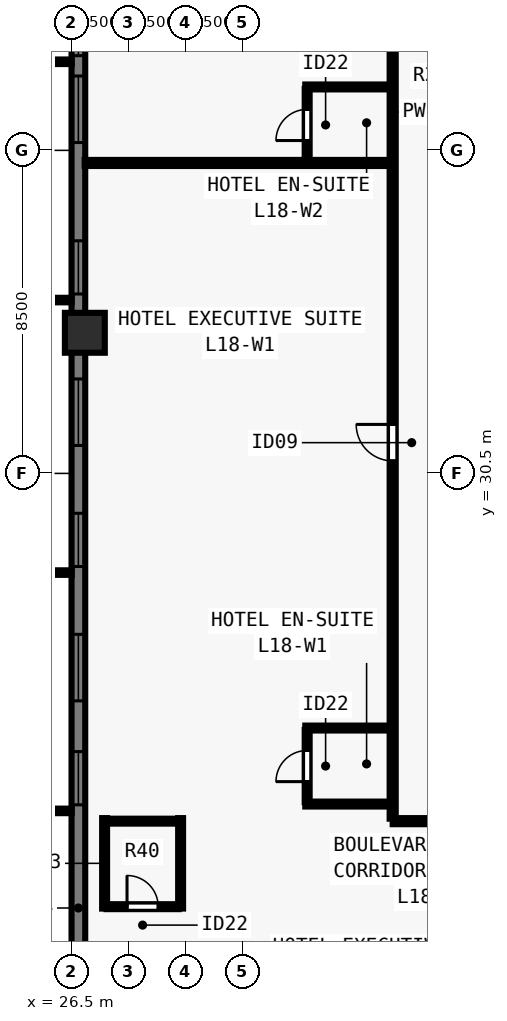
"""IFC4 building model, lengths in metres.
Left out: names, types, materials, properties, quantities, classifications, styles, units other than length and angle.
Written with IfcOpenShell. Run it as: python <this file> out.ifc"""

import sys

from ifc_helpers import new_model, si_unit, direction, frame, frame_2d, origin, origin_2d, place, context, subcontext, project, spatial, rectangle, extrude, element, fill, save


model = new_model("IFC4")
c1 = context("Model", 3, precision=1e-05, world=origin(), true_north=direction((0.0, 1.0)))
c2 = subcontext(c1, "Body", "Model", "MODEL_VIEW")
j1 = project(units=[si_unit("LENGTHUNIT", "METRE"), si_unit("PLANEANGLEUNIT", "RADIAN")], contexts=[c1])
p1 = place(None, origin())
s1 = spatial("IfcSite", under=j1, at=p1, CompositionType="ELEMENT")
p2 = place(p1, origin())
s2 = spatial("IfcBuilding", under=s1, at=p2, CompositionType="ELEMENT")
p3 = place(p2, frame((0.0, 0.0, 69.0)))
s3 = spatial("IfcBuildingStorey", under=s2, at=p3, CompositionType="ELEMENT", Elevation=69.0)
p4 = place(p3, frame((26.85, 34.2, 0.0), z_axis=(0.0, 0.0, 1.0), x_axis=(0.0, 1.0, 0.0)))
e1 = element("IfcColumn", 1, at=p4, inside=s3, PredefinedType="COLUMN", context=c2, shape_type="SweptSolid", body=[
    extrude(rectangle(XDim=1.05, YDim=1.05, at=origin_2d()), origin(), (0.0, 0.0, 1.0), 3.5),
])
p5 = place(p3, frame((26.68, 16.5, 0.0), z_axis=(0.0, 0.0, 1.0), x_axis=(0.0, 1.0, 0.0)))
e2 = element("IfcWall", 2, at=p5, inside=s3, PredefinedType="SOLIDWALL", context=c2, shape_type="SweptSolid", body=[
    extrude(rectangle(XDim=44.662, YDim=0.36, at=frame_2d((22.331, 0.0))), origin(), (0.0, 0.0, 1.0), 3.28),
])
p6 = place(p5, frame((5.28, 0.0, 0.8)))
e3 = element("IfcOpeningElement", 3, at=p6, cuts=e2, PredefinedType="OPENING", context=c2, shape_type="SweptSolid", body=[
    extrude(rectangle(XDim=1.4, YDim=1.544, at=frame_2d((0.7, 0.772))), frame((0.0, 0.19, 0.0), z_axis=(0.0, -1.0, 0.0), x_axis=(1.0, 0.0, 0.0)), (0.0, 0.0, 1.0), 0.38),
])
p7 = place(p5, frame((8.015, 0.0, 0.8)))
e4 = element("IfcOpeningElement", 4, at=p7, cuts=e2, PredefinedType="OPENING", context=c2, shape_type="SweptSolid", body=[
    extrude(rectangle(XDim=1.75, YDim=1.544, at=frame_2d((0.875, 0.772))), frame((0.0, 0.19, 0.0), z_axis=(0.0, -1.0, 0.0), x_axis=(1.0, 0.0, 0.0)), (0.0, 0.0, 1.0), 0.38),
])
p8 = place(p5, frame((11.551, 0.0, 0.8)))
e5 = element("IfcOpeningElement", 5, at=p8, cuts=e2, PredefinedType="OPENING", context=c2, shape_type="SweptSolid", body=[
    extrude(rectangle(XDim=1.4, YDim=1.544, at=frame_2d((0.7, 0.772))), frame((0.0, 0.19, 0.0), z_axis=(0.0, -1.0, 0.0), x_axis=(1.0, 0.0, 0.0)), (0.0, 0.0, 1.0), 0.38),
])
p9 = place(p5, frame((14.736, 0.0, 0.8)))
e6 = element("IfcOpeningElement", 6, at=p9, cuts=e2, PredefinedType="OPENING", context=c2, shape_type="SweptSolid", body=[
    extrude(rectangle(XDim=1.75, YDim=1.544, at=frame_2d((0.875, 0.772))), frame((0.0, 0.19, 0.0), z_axis=(0.0, -1.0, 0.0), x_axis=(1.0, 0.0, 0.0)), (0.0, 0.0, 1.0), 0.38),
])
p10 = place(p5, frame((18.721, 0.0, 0.8)))
e7 = element("IfcOpeningElement", 7, at=p10, cuts=e2, PredefinedType="OPENING", context=c2, shape_type="SweptSolid", body=[
    extrude(rectangle(XDim=1.4, YDim=1.544, at=frame_2d((0.7, 0.772))), frame((0.0, 0.19, 0.0), z_axis=(0.0, -1.0, 0.0), x_axis=(1.0, 0.0, 0.0)), (0.0, 0.0, 1.0), 0.38),
])
p11 = place(p5, frame((22.706, 0.0, 0.8)))
e8 = element("IfcOpeningElement", 8, at=p11, cuts=e2, PredefinedType="OPENING", context=c2, shape_type="SweptSolid", body=[
    extrude(rectangle(XDim=1.75, YDim=1.544, at=frame_2d((0.875, 0.772))), frame((0.0, 0.19, 0.0), z_axis=(0.0, -1.0, 0.0), x_axis=(1.0, 0.0, 0.0)), (0.0, 0.0, 1.0), 0.38),
])
p12 = place(p5, frame((24.991, 0.0, 0.8)))
e9 = element("IfcOpeningElement", 9, at=p12, cuts=e2, PredefinedType="OPENING", context=c2, shape_type="SweptSolid", body=[
    extrude(rectangle(XDim=1.4, YDim=1.544, at=frame_2d((0.7, 0.772))), frame((0.0, 0.19, 0.0), z_axis=(0.0, -1.0, 0.0), x_axis=(1.0, 0.0, 0.0)), (0.0, 0.0, 1.0), 0.38),
])
p13 = place(p5, frame((28.177, 0.0, 0.8)))
e10 = element("IfcOpeningElement", 10, at=p13, cuts=e2, PredefinedType="OPENING", context=c2, shape_type="SweptSolid", body=[
    extrude(rectangle(XDim=1.75, YDim=1.544, at=frame_2d((0.875, 0.772))), frame((0.0, 0.19, 0.0), z_axis=(0.0, -1.0, 0.0), x_axis=(1.0, 0.0, 0.0)), (0.0, 0.0, 1.0), 0.38),
])
p14 = place(p5, frame((31.711, 0.0, 0.8)))
e11 = element("IfcOpeningElement", 11, at=p14, cuts=e2, PredefinedType="OPENING", context=c2, shape_type="SweptSolid", body=[
    extrude(rectangle(XDim=1.4, YDim=1.544, at=frame_2d((0.7, 0.772))), frame((0.0, 0.19, 0.0), z_axis=(0.0, -1.0, 0.0), x_axis=(1.0, 0.0, 0.0)), (0.0, 0.0, 1.0), 0.38),
])
p15 = place(p5, frame((34.897, 0.0, 0.8)))
e12 = element("IfcOpeningElement", 12, at=p15, cuts=e2, PredefinedType="OPENING", context=c2, shape_type="SweptSolid", body=[
    extrude(rectangle(XDim=1.75, YDim=1.544, at=frame_2d((0.875, 0.772))), frame((0.0, 0.19, 0.0), z_axis=(0.0, -1.0, 0.0), x_axis=(1.0, 0.0, 0.0)), (0.0, 0.0, 1.0), 0.38),
])
p16 = place(p5, frame((37.982, 0.0, 0.8)))
e13 = element("IfcOpeningElement", 13, at=p16, cuts=e2, PredefinedType="OPENING", context=c2, shape_type="SweptSolid", body=[
    extrude(rectangle(XDim=1.4, YDim=1.544, at=frame_2d((0.7, 0.772))), frame((0.0, 0.19, 0.0), z_axis=(0.0, -1.0, 0.0), x_axis=(1.0, 0.0, 0.0)), (0.0, 0.0, 1.0), 0.38),
])
p17 = place(p3, frame((34.95, 21.35, 0.0), z_axis=(0.0, 0.0, 1.0), x_axis=(1.0, 0.0, 0.0)))
e14 = element("IfcWall", 14, at=p17, inside=s3, PredefinedType="PARTITIONING", context=c2, shape_type="SweptSolid", body=[
    extrude(rectangle(XDim=34.1, YDim=0.16, at=frame_2d((17.05, 0.0))), origin(), (0.0, 0.0, 1.0), 3.28),
])
p18 = place(p17, frame((3.614, 0.0, 0.0)))
e15 = element("IfcOpeningElement", 15, at=p18, cuts=e14, PredefinedType="OPENING", context=c2, shape_type="SweptSolid", body=[
    extrude(rectangle(XDim=0.96, YDim=2.15, at=frame_2d((0.48, 1.075))), frame((0.0, 0.09, 0.0), z_axis=(0.0, -1.0, 0.0), x_axis=(1.0, 0.0, 0.0)), (0.0, 0.0, 1.0), 0.18),
])
p19 = place(p17, frame((17.56, 0.0, 0.0)))
e16 = element("IfcOpeningElement", 16, at=p19, cuts=e14, PredefinedType="OPENING", context=c2, shape_type="SweptSolid", body=[
    extrude(rectangle(XDim=0.96, YDim=2.15, at=frame_2d((0.48, 1.075))), frame((0.0, 0.09, 0.0), z_axis=(0.0, -1.0, 0.0), x_axis=(1.0, 0.0, 0.0)), (0.0, 0.0, 1.0), 0.18),
])
p20 = place(p17, frame((30.516, 0.0, 0.0)))
e17 = element("IfcOpeningElement", 17, at=p20, cuts=e14, PredefinedType="OPENING", context=c2, shape_type="SweptSolid", body=[
    extrude(rectangle(XDim=0.96, YDim=2.15, at=frame_2d((0.48, 1.075))), frame((0.0, 0.09, 0.0), z_axis=(0.0, -1.0, 0.0), x_axis=(1.0, 0.0, 0.0)), (0.0, 0.0, 1.0), 0.18),
])
p21 = place(p3, frame((34.95, 21.415, 0.0), z_axis=(0.0, 0.0, 1.0), x_axis=(0.0, 1.0, 0.0)))
e18 = element("IfcWall", 18, at=p21, inside=s3, PredefinedType="PARTITIONING", context=c2, shape_type="SweptSolid", body=[
    extrude(rectangle(XDim=35.17, YDim=0.16, at=frame_2d((17.585, 0.0))), origin(), (0.0, 0.0, 1.0), 3.28),
])
p22 = place(p21, frame((9.414, 0.0, 0.0)))
e19 = element("IfcOpeningElement", 19, at=p22, cuts=e18, PredefinedType="OPENING", context=c2, shape_type="SweptSolid", body=[
    extrude(rectangle(XDim=0.96, YDim=2.15, at=frame_2d((0.48, 1.075))), frame((0.0, 0.09, 0.0), z_axis=(0.0, -1.0, 0.0), x_axis=(1.0, 0.0, 0.0)), (0.0, 0.0, 1.0), 0.18),
])
p23 = place(p21, frame((26.814, 0.0, 0.0)))
e20 = element("IfcOpeningElement", 20, at=p23, cuts=e18, PredefinedType="OPENING", context=c2, shape_type="SweptSolid", body=[
    extrude(rectangle(XDim=0.96, YDim=2.15, at=frame_2d((0.48, 1.075))), frame((0.0, 0.09, 0.0), z_axis=(0.0, -1.0, 0.0), x_axis=(1.0, 0.0, 0.0)), (0.0, 0.0, 1.0), 0.18),
])
for number, where, z_axis, x_axis in (
    (21, (27.37, 19.05, 0.0), (0.0, 0.0, 1.0), (0.0, 1.0, 0.0)),
    (22, (29.37, 19.05, 0.0), (0.0, 0.0, 1.0), (0.0, 1.0, 0.0)),
):
    element("IfcWall", number, at=place(p3, frame(where, z_axis=z_axis, x_axis=x_axis)), inside=s3, PredefinedType="PLUMBINGWALL", context=c2, shape_type="SweptSolid", body=[
        extrude(rectangle(XDim=2.38, YDim=0.13, at=frame_2d((1.19, 0.0))), origin(), (0.0, 0.0, 1.0), 3.28),
    ])
p24 = place(p3, frame((27.42, 19.1, 0.0), z_axis=(0.0, 0.0, 1.0), x_axis=(1.0, 0.0, 0.0)))
e23 = element("IfcWall", 23, at=p24, inside=s3, PredefinedType="PLUMBINGWALL", context=c2, shape_type="SweptSolid", body=[
    extrude(rectangle(XDim=1.9, YDim=0.13, at=frame_2d((0.95, 0.0))), origin(), (0.0, 0.0, 1.0), 3.28),
])
p25 = place(p24, frame((0.54, 0.0, 0.0)))
e24 = element("IfcOpeningElement", 24, at=p25, cuts=e23, PredefinedType="OPENING", context=c2, shape_type="SweptSolid", body=[
    extrude(rectangle(XDim=0.82, YDim=2.1, at=frame_2d((0.41, 1.05))), frame((0.0, 0.075, 0.0), z_axis=(0.0, -1.0, 0.0), x_axis=(1.0, 0.0, 0.0)), (0.0, 0.0, 1.0), 0.15),
])
p26 = place(p3, frame((27.42, 21.35, 0.0), z_axis=(0.0, 0.0, 1.0), x_axis=(1.0, 0.0, 0.0)))
e25 = element("IfcWall", 25, at=p26, inside=s3, PredefinedType="PLUMBINGWALL", context=c2, shape_type="SweptSolid", body=[
    extrude(rectangle(XDim=1.9, YDim=0.13, at=frame_2d((0.95, 0.0))), origin(), (0.0, 0.0, 1.0), 3.28),
])
p27 = place(p3, frame((32.65, 21.8, 0.0), z_axis=(0.0, 0.0, 1.0), x_axis=(1.0, 0.0, 0.0)))
e26 = element("IfcWall", 26, at=p27, inside=s3, PredefinedType="PLUMBINGWALL", context=c2, shape_type="SweptSolid", body=[
    extrude(rectangle(XDim=2.235, YDim=0.13, at=frame_2d((1.118, 0.0))), origin(), (0.0, 0.0, 1.0), 2.849),
])
p28 = place(p3, frame((32.65, 23.8, 0.0), z_axis=(0.0, 0.0, 1.0), x_axis=(1.0, 0.0, 0.0)))
e27 = element("IfcWall", 27, at=p28, inside=s3, PredefinedType="PLUMBINGWALL", context=c2, shape_type="SweptSolid", body=[
    extrude(rectangle(XDim=2.235, YDim=0.13, at=frame_2d((1.118, 0.0))), origin(), (0.0, 0.0, 1.0), 3.28),
])
p29 = place(p3, frame((32.7, 21.85, 0.0), z_axis=(0.0, 0.0, 1.0), x_axis=(0.0, 1.0, 0.0)))
e28 = element("IfcWall", 28, at=p29, inside=s3, PredefinedType="PLUMBINGWALL", context=c2, shape_type="SweptSolid", body=[
    extrude(rectangle(XDim=1.9, YDim=0.13, at=frame_2d((0.95, 0.0))), origin(), (0.0, 0.0, 1.0), 3.28),
])
p30 = place(p29, frame((0.54, 0.0, 0.0)))
e29 = element("IfcOpeningElement", 29, at=p30, cuts=e28, PredefinedType="OPENING", context=c2, shape_type="SweptSolid", body=[
    extrude(rectangle(XDim=0.82, YDim=2.1, at=frame_2d((0.41, 1.05))), frame((0.0, 0.075, 0.0), z_axis=(0.0, -1.0, 0.0), x_axis=(1.0, 0.0, 0.0)), (0.0, 0.0, 1.0), 0.15),
])
p31 = place(p3, frame((26.845, 38.668, 0.0), z_axis=(0.0, 0.0, 1.0), x_axis=(1.0, 0.0, 0.0)))
e30 = element("IfcWall", 30, at=p31, inside=s3, PredefinedType="PARTITIONING", context=c2, shape_type="SweptSolid", body=[
    extrude(rectangle(XDim=8.04, YDim=0.16, at=frame_2d((4.02, 0.0))), origin(), (0.0, 0.0, 1.0), 2.849),
])
p32 = place(p3, frame((32.65, 40.668, 0.0), z_axis=(0.0, 0.0, 1.0), x_axis=(1.0, 0.0, 0.0)))
e31 = element("IfcWall", 31, at=p32, inside=s3, PredefinedType="PLUMBINGWALL", context=c2, shape_type="SweptSolid", body=[
    extrude(rectangle(XDim=2.235, YDim=0.13, at=frame_2d((1.118, 0.0))), origin(), (0.0, 0.0, 1.0), 3.28),
])
p33 = place(p3, frame((32.7, 38.733, 0.0), z_axis=(0.0, 0.0, 1.0), x_axis=(0.0, 1.0, 0.0)))
e32 = element("IfcWall", 32, at=p33, inside=s3, PredefinedType="PLUMBINGWALL", context=c2, shape_type="SweptSolid", body=[
    extrude(rectangle(XDim=1.885, YDim=0.13, at=frame_2d((0.942, 0.0))), origin(), (0.0, 0.0, 1.0), 3.28),
])
p34 = place(p33, frame((0.525, 0.0, 0.0)))
e33 = element("IfcOpeningElement", 33, at=p34, cuts=e32, PredefinedType="OPENING", context=c2, shape_type="SweptSolid", body=[
    extrude(rectangle(XDim=0.82, YDim=2.1, at=frame_2d((0.41, 1.05))), frame((0.0, 0.075, 0.0), z_axis=(0.0, -1.0, 0.0), x_axis=(1.0, 0.0, 0.0)), (0.0, 0.0, 1.0), 0.15),
])
p35 = place(p6, origin())
e34 = element("IfcWindow", 34, at=p35, inside=s3, PartitioningType="SINGLE_PANEL", PredefinedType="WINDOW", context=c2, shape_type="SweptSolid", body=[
    extrude(rectangle(XDim=1.4, YDim=1.544, at=frame_2d((0.7, 0.772))), frame((0.0, -0.05, 0.0), z_axis=(0.0, -1.0, 0.0), x_axis=(1.0, 0.0, 0.0)), (0.0, 0.0, 1.0), 0.06),
])
fill(e3, e34)
p36 = place(p7, origin())
e35 = element("IfcWindow", 35, at=p36, inside=s3, PartitioningType="SINGLE_PANEL", PredefinedType="WINDOW", context=c2, shape_type="SweptSolid", body=[
    extrude(rectangle(XDim=1.75, YDim=1.544, at=frame_2d((0.875, 0.772))), frame((0.0, -0.05, 0.0), z_axis=(0.0, -1.0, 0.0), x_axis=(1.0, 0.0, 0.0)), (0.0, 0.0, 1.0), 0.06),
])
fill(e4, e35)
p37 = place(p8, origin())
e36 = element("IfcWindow", 36, at=p37, inside=s3, PartitioningType="SINGLE_PANEL", PredefinedType="WINDOW", context=c2, shape_type="SweptSolid", body=[
    extrude(rectangle(XDim=1.4, YDim=1.544, at=frame_2d((0.7, 0.772))), frame((0.0, -0.05, 0.0), z_axis=(0.0, -1.0, 0.0), x_axis=(1.0, 0.0, 0.0)), (0.0, 0.0, 1.0), 0.06),
])
fill(e5, e36)
p38 = place(p9, origin())
e37 = element("IfcWindow", 37, at=p38, inside=s3, PartitioningType="SINGLE_PANEL", PredefinedType="WINDOW", context=c2, shape_type="SweptSolid", body=[
    extrude(rectangle(XDim=1.75, YDim=1.544, at=frame_2d((0.875, 0.772))), frame((0.0, -0.05, 0.0), z_axis=(0.0, -1.0, 0.0), x_axis=(1.0, 0.0, 0.0)), (0.0, 0.0, 1.0), 0.06),
])
fill(e6, e37)
p39 = place(p10, origin())
e38 = element("IfcWindow", 38, at=p39, inside=s3, PartitioningType="SINGLE_PANEL", PredefinedType="WINDOW", context=c2, shape_type="SweptSolid", body=[
    extrude(rectangle(XDim=1.4, YDim=1.544, at=frame_2d((0.7, 0.772))), frame((0.0, -0.05, 0.0), z_axis=(0.0, -1.0, 0.0), x_axis=(1.0, 0.0, 0.0)), (0.0, 0.0, 1.0), 0.06),
])
fill(e7, e38)
p40 = place(p11, origin())
e39 = element("IfcWindow", 39, at=p40, inside=s3, PartitioningType="SINGLE_PANEL", PredefinedType="WINDOW", context=c2, shape_type="SweptSolid", body=[
    extrude(rectangle(XDim=1.75, YDim=1.544, at=frame_2d((0.875, 0.772))), frame((0.0, -0.05, 0.0), z_axis=(0.0, -1.0, 0.0), x_axis=(1.0, 0.0, 0.0)), (0.0, 0.0, 1.0), 0.06),
])
fill(e8, e39)
p41 = place(p12, origin())
e40 = element("IfcWindow", 40, at=p41, inside=s3, PartitioningType="SINGLE_PANEL", PredefinedType="WINDOW", context=c2, shape_type="SweptSolid", body=[
    extrude(rectangle(XDim=1.4, YDim=1.544, at=frame_2d((0.7, 0.772))), frame((0.0, -0.05, 0.0), z_axis=(0.0, -1.0, 0.0), x_axis=(1.0, 0.0, 0.0)), (0.0, 0.0, 1.0), 0.06),
])
fill(e9, e40)
p42 = place(p25, origin())
e41 = element("IfcDoor", 41, at=p42, inside=s3, OperationType="SINGLE_SWING_LEFT", PredefinedType="DOOR", context=c2, shape_type="SweptSolid", body=[
    extrude(rectangle(XDim=0.82, YDim=2.1, at=frame_2d((0.41, 1.05))), frame((0.0, 0.025, 0.0), z_axis=(0.0, -1.0, 0.0), x_axis=(1.0, 0.0, 0.0)), (0.0, 0.0, 1.0), 0.05),
])
fill(e24, e41)
p43 = place(p30, origin())
e42 = element("IfcDoor", 42, at=p43, inside=s3, OperationType="SINGLE_SWING_LEFT", PredefinedType="DOOR", context=c2, shape_type="SweptSolid", body=[
    extrude(rectangle(XDim=0.82, YDim=2.1, at=frame_2d((0.41, 1.05))), frame((0.0, 0.025, 0.0), z_axis=(0.0, -1.0, 0.0), x_axis=(1.0, 0.0, 0.0)), (0.0, 0.0, 1.0), 0.05),
])
fill(e29, e42)
p44 = place(p22, origin())
e43 = element("IfcDoor", 43, at=p44, inside=s3, OperationType="SINGLE_SWING_RIGHT", PredefinedType="DOOR", context=c2, shape_type="SweptSolid", body=[
    extrude(rectangle(XDim=0.96, YDim=2.15, at=frame_2d((0.48, 1.075))), frame((0.0, 0.025, 0.0), z_axis=(0.0, -1.0, 0.0), x_axis=(1.0, 0.0, 0.0)), (0.0, 0.0, 1.0), 0.05),
])
fill(e19, e43)
p45 = place(p34, origin())
e44 = element("IfcDoor", 44, at=p45, inside=s3, OperationType="SINGLE_SWING_LEFT", PredefinedType="DOOR", context=c2, shape_type="SweptSolid", body=[
    extrude(rectangle(XDim=0.82, YDim=2.1, at=frame_2d((0.41, 1.05))), frame((0.0, 0.025, 0.0), z_axis=(0.0, -1.0, 0.0), x_axis=(1.0, 0.0, 0.0)), (0.0, 0.0, 1.0), 0.05),
])
fill(e33, e44)
save(model, sys.argv[1])
